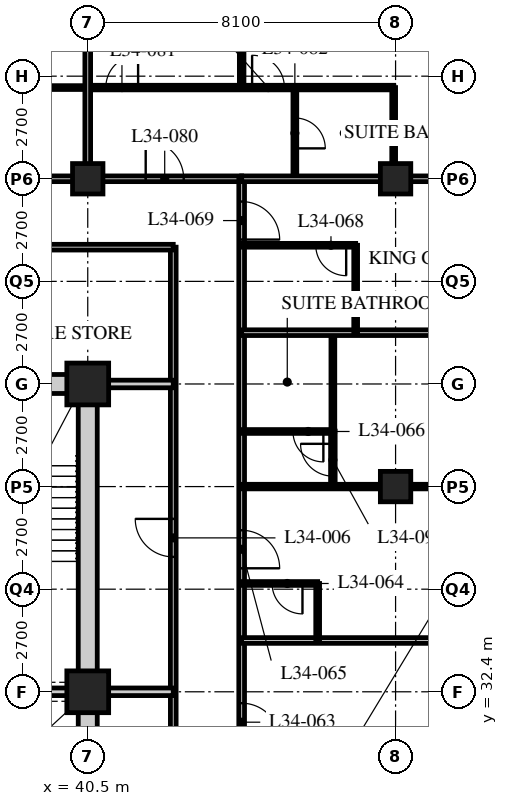
"""IFC4 building model, lengths in metres.
Left out: names, types, materials, properties, quantities, classifications, styles, units other than length and angle.
Written with IfcOpenShell. Run it as: python <this file> out.ifc"""

import sys

from ifc_helpers import new_model, si_unit, direction, frame, frame_2d, origin, origin_2d, place, context, subcontext, project, spatial, rectangle, hollow_rectangle, extrude, element, fill, save


model = new_model("IFC4")
c1 = context("Model", 3, precision=1e-05, world=origin(), true_north=direction((0.0, 1.0)))
c2 = subcontext(c1, "Body", "Model", "MODEL_VIEW")
j1 = project(units=[si_unit("LENGTHUNIT", "METRE"), si_unit("PLANEANGLEUNIT", "RADIAN")], contexts=[c1])
p1 = place(None, origin())
s1 = spatial("IfcSite", under=j1, at=p1, CompositionType="ELEMENT")
p2 = place(p1, origin())
s2 = spatial("IfcBuilding", under=s1, at=p2, CompositionType="ELEMENT")
p3 = place(p2, frame((0.0, 0.0, 134.0)))
s3 = spatial("IfcBuildingStorey", under=s2, at=p3, CompositionType="ELEMENT", Elevation=134.0)
for number, where, z_axis, x_axis in (
    (1, (40.5, 32.4, 0.0), (0.0, 0.0, 1.0), (1.0, 0.0, 0.0)),
    (2, (40.5, 40.5, 0.0), (0.0, 0.0, 1.0), (1.0, 0.0, 0.0)),
):
    element("IfcColumn", number, at=place(p3, frame(where, z_axis=z_axis, x_axis=x_axis)), inside=s3, PredefinedType="COLUMN", context=c2, shape_type="SweptSolid", body=[
        extrude(hollow_rectangle(XDim=1.1, YDim=1.1, WallThickness=0.1, at=origin_2d()), origin(), (0.0, 0.0, 1.0), 3.4),
    ])
for number, where, z_axis, x_axis in (
    (3, (40.5, 45.9, 0.0), (0.0, 0.0, 1.0), (1.0, 0.0, 0.0)),
    (4, (48.6, 37.8, 0.0), (0.0, 0.0, 1.0), (1.0, 0.0, 0.0)),
    (5, (48.6, 45.9, 0.0), (0.0, 0.0, 1.0), (1.0, 0.0, 0.0)),
):
    element("IfcColumn", number, at=place(p3, frame(where, z_axis=z_axis, x_axis=x_axis)), inside=s3, PredefinedType="COLUMN", context=c2, shape_type="SweptSolid", body=[
        extrude(hollow_rectangle(XDim=0.8, YDim=0.8, WallThickness=0.08, at=origin_2d()), origin(), (0.0, 0.0, 1.0), 3.4),
    ])
p4 = place(p3, frame((8.1, 45.9, 0.0), z_axis=(0.0, 0.0, 1.0), x_axis=(1.0, 0.0, 0.0)))
e6 = element("IfcWall", 6, at=p4, inside=s3, PredefinedType="PARTITIONING", context=c2, shape_type="SweptSolid", body=[
    extrude(rectangle(XDim=36.45, YDim=0.15, at=frame_2d((18.225, 0.0))), origin(), (0.0, 0.0, 1.0), 2.578),
])
p5 = place(p4, frame((9.625, 0.0, 0.0)))
e7 = element("IfcOpeningElement", 7, at=p5, cuts=e6, PredefinedType="OPENING", context=c2, shape_type="SweptSolid", body=[
    extrude(rectangle(XDim=1.0, YDim=2.1, at=frame_2d((0.5, 1.05))), frame((0.0, 0.085, 0.0), z_axis=(0.0, -1.0, 0.0), x_axis=(1.0, 0.0, 0.0)), (0.0, 0.0, 1.0), 0.17),
])
p6 = place(p4, frame((21.775, 0.0, 0.0)))
e8 = element("IfcOpeningElement", 8, at=p6, cuts=e6, PredefinedType="OPENING", context=c2, shape_type="SweptSolid", body=[
    extrude(rectangle(XDim=1.0, YDim=2.1, at=frame_2d((0.5, 1.05))), frame((0.0, 0.085, 0.0), z_axis=(0.0, -1.0, 0.0), x_axis=(1.0, 0.0, 0.0)), (0.0, 0.0, 1.0), 0.17),
])
p7 = place(p4, frame((28.95, 0.0, 0.0)))
e9 = element("IfcOpeningElement", 9, at=p7, cuts=e6, PredefinedType="OPENING", context=c2, shape_type="SweptSolid", body=[
    extrude(rectangle(XDim=1.0, YDim=2.1, at=frame_2d((0.5, 1.05))), frame((0.0, 0.085, 0.0), z_axis=(0.0, -1.0, 0.0), x_axis=(1.0, 0.0, 0.0)), (0.0, 0.0, 1.0), 0.17),
])
p8 = place(p4, frame((33.925, 0.0, 0.0)))
e10 = element("IfcOpeningElement", 10, at=p8, cuts=e6, PredefinedType="OPENING", context=c2, shape_type="SweptSolid", body=[
    extrude(rectangle(XDim=1.0, YDim=2.1, at=frame_2d((0.5, 1.05))), frame((0.0, 0.085, 0.0), z_axis=(0.0, -1.0, 0.0), x_axis=(1.0, 0.0, 0.0)), (0.0, 0.0, 1.0), 0.17),
])
p9 = place(p4, frame((2.625, 0.0, 0.0)))
e11 = element("IfcOpeningElement", 11, at=p9, cuts=e6, PredefinedType="OPENING", context=c2, shape_type="SweptSolid", body=[
    extrude(rectangle(XDim=1.0, YDim=2.1, at=frame_2d((0.5, 1.05))), frame((0.0, 0.085, 0.0), z_axis=(0.0, -1.0, 0.0), x_axis=(1.0, 0.0, 0.0)), (0.0, 0.0, 1.0), 0.17),
])
p10 = place(p3, frame((44.55, 17.55, 0.0), z_axis=(0.0, 0.0, 1.0), x_axis=(0.0, 1.0, 0.0)))
e12 = element("IfcWall", 12, at=p10, inside=s3, PredefinedType="PARTITIONING", context=c2, shape_type="SweptSolid", body=[
    extrude(rectangle(XDim=28.35, YDim=0.15, at=frame_2d((14.175, 0.0))), origin(), (0.0, 0.0, 1.0), 3.19),
])
p11 = place(p10, frame((2.75, 0.0, 0.0)))
e13 = element("IfcOpeningElement", 13, at=p11, cuts=e12, PredefinedType="OPENING", context=c2, shape_type="SweptSolid", body=[
    extrude(rectangle(XDim=1.0, YDim=2.1, at=frame_2d((0.5, 1.05))), frame((0.0, 0.085, 0.0), z_axis=(0.0, -1.0, 0.0), x_axis=(1.0, 0.0, 0.0)), (0.0, 0.0, 1.0), 0.17),
])
p12 = place(p10, frame((6.5, 0.0, 0.0)))
e14 = element("IfcOpeningElement", 14, at=p12, cuts=e12, PredefinedType="OPENING", context=c2, shape_type="SweptSolid", body=[
    extrude(rectangle(XDim=1.0, YDim=2.1, at=frame_2d((0.5, 1.05))), frame((0.0, 0.085, 0.0), z_axis=(0.0, -1.0, 0.0), x_axis=(1.0, 0.0, 0.0)), (0.0, 0.0, 1.0), 0.17),
])
p13 = place(p10, frame((13.55, 0.0, 0.0)))
e15 = element("IfcOpeningElement", 15, at=p13, cuts=e12, PredefinedType="OPENING", context=c2, shape_type="SweptSolid", body=[
    extrude(rectangle(XDim=1.0, YDim=2.1, at=frame_2d((0.5, 1.05))), frame((0.0, 0.085, 0.0), z_axis=(0.0, -1.0, 0.0), x_axis=(1.0, 0.0, 0.0)), (0.0, 0.0, 1.0), 0.17),
])
p14 = place(p10, frame((18.1, 0.0, 0.0)))
e16 = element("IfcOpeningElement", 16, at=p14, cuts=e12, PredefinedType="OPENING", context=c2, shape_type="SweptSolid", body=[
    extrude(rectangle(XDim=1.0, YDim=2.1, at=frame_2d((0.5, 1.05))), frame((0.0, 0.085, 0.0), z_axis=(0.0, -1.0, 0.0), x_axis=(1.0, 0.0, 0.0)), (0.0, 0.0, 1.0), 0.17),
])
p15 = place(p10, frame((26.75, 0.0, 0.0)))
e17 = element("IfcOpeningElement", 17, at=p15, cuts=e12, PredefinedType="OPENING", context=c2, shape_type="SweptSolid", body=[
    extrude(rectangle(XDim=1.0, YDim=2.1, at=frame_2d((0.5, 1.05))), frame((0.0, 0.085, 0.0), z_axis=(0.0, -1.0, 0.0), x_axis=(1.0, 0.0, 0.0)), (0.0, 0.0, 1.0), 0.17),
])
p16 = place(p3, frame((42.75, 19.35, 0.0), z_axis=(0.0, 0.0, 1.0), x_axis=(0.0, 1.0, 0.0)))
e18 = element("IfcWall", 18, at=p16, inside=s3, PredefinedType="PARTITIONING", context=c2, shape_type="SweptSolid", body=[
    extrude(rectangle(XDim=24.75, YDim=0.15, at=frame_2d((12.375, 0.0))), origin(), (0.0, 0.0, 1.0), 3.19),
])
p17 = place(p16, frame((8.5, 0.0, 0.0)))
e19 = element("IfcOpeningElement", 19, at=p17, cuts=e18, PredefinedType="OPENING", context=c2, shape_type="SweptSolid", body=[
    extrude(rectangle(XDim=1.0, YDim=2.1, at=frame_2d((0.5, 1.05))), frame((0.0, 0.085, 0.0), z_axis=(0.0, -1.0, 0.0), x_axis=(1.0, 0.0, 0.0)), (0.0, 0.0, 1.0), 0.17),
])
p18 = place(p16, frame((16.6, 0.0, 0.0)))
e20 = element("IfcOpeningElement", 20, at=p18, cuts=e18, PredefinedType="OPENING", context=c2, shape_type="SweptSolid", body=[
    extrude(rectangle(XDim=1.0, YDim=2.1, at=frame_2d((0.5, 1.05))), frame((0.0, 0.085, 0.0), z_axis=(0.0, -1.0, 0.0), x_axis=(1.0, 0.0, 0.0)), (0.0, 0.0, 1.0), 0.17),
])
p19 = place(p3, frame((42.75, 44.1, 0.0), z_axis=(0.0, 0.0, 1.0), x_axis=(-1.0, 0.0, 0.0)))
e21 = element("IfcWall", 21, at=p19, inside=s3, PredefinedType="PARTITIONING", context=c2, shape_type="SweptSolid", body=[
    extrude(rectangle(XDim=13.19, YDim=0.15, at=frame_2d((6.595, 0.0))), origin(), (0.0, 0.0, 1.0), 3.19),
])
p20 = place(p19, frame((10.2, 0.0, 0.0)))
e22 = element("IfcOpeningElement", 22, at=p20, cuts=e21, PredefinedType="OPENING", context=c2, shape_type="SweptSolid", body=[
    extrude(rectangle(XDim=1.0, YDim=2.1, at=frame_2d((0.5, 1.05))), frame((0.0, 0.085, 0.0), z_axis=(0.0, -1.0, 0.0), x_axis=(1.0, 0.0, 0.0)), (0.0, 0.0, 1.0), 0.17),
])
p21 = place(p19, frame((3.6, 0.0, 0.0)))
e23 = element("IfcOpeningElement", 23, at=p21, cuts=e21, PredefinedType="OPENING", context=c2, shape_type="SweptSolid", body=[
    extrude(rectangle(XDim=1.0, YDim=2.1, at=frame_2d((0.5, 1.05))), frame((0.0, 0.085, 0.0), z_axis=(0.0, -1.0, 0.0), x_axis=(1.0, 0.0, 0.0)), (0.0, 0.0, 1.0), 0.17),
])
for number, where, z_axis, x_axis in (
    (24, (40.5, 32.4, 0.0), (0.0, 0.0, 1.0), (1.0, 0.0, 0.0)),
    (25, (40.5, 40.5, 0.0), (0.0, 0.0, 1.0), (1.0, 0.0, 0.0)),
):
    element("IfcWall", number, at=place(p3, frame(where, z_axis=z_axis, x_axis=x_axis)), inside=s3, PredefinedType="SOLIDWALL", context=c2, shape_type="SweptSolid", body=[
        extrude(rectangle(XDim=2.25, YDim=0.2, at=frame_2d((1.125, 0.0))), origin(), (0.0, 0.0, 1.0), 3.19),
    ])
p22 = place(p3, frame((38.2, 48.3, 0.0), z_axis=(0.0, 0.0, 1.0), x_axis=(1.0, 0.0, 0.0)))
e26 = element("IfcWall", 26, at=p22, inside=s3, PredefinedType="PARTITIONING", context=c2, shape_type="SweptSolid", body=[
    extrude(rectangle(XDim=2.3, YDim=0.1, at=frame_2d((1.15, 0.0))), origin(), (0.0, 0.0, 1.0), 3.19),
])
p23 = place(p3, frame((44.55, 33.75, 0.0), z_axis=(0.0, 0.0, 1.0), x_axis=(1.0, 0.0, 0.0)))
e27 = element("IfcWall", 27, at=p23, inside=s3, PredefinedType="PARTITIONING", context=c2, shape_type="SweptSolid", body=[
    extrude(rectangle(XDim=11.85, YDim=0.15, at=frame_2d((5.925, 0.0))), origin(), (0.0, 0.0, 1.0), 3.19),
])
p24 = place(p3, frame((46.55, 33.75, 0.0), z_axis=(0.0, 0.0, 1.0), x_axis=(0.0, 1.0, 0.0)))
e28 = element("IfcWall", 28, at=p24, inside=s3, PredefinedType="PARTITIONING", context=c2, shape_type="SweptSolid", body=[
    extrude(rectangle(XDim=1.5, YDim=0.1, at=frame_2d((0.75, 0.0))), origin(), (0.0, 0.0, 1.0), 3.19),
])
p25 = place(p3, frame((44.55, 35.25, 0.0), z_axis=(0.0, 0.0, 1.0), x_axis=(1.0, 0.0, 0.0)))
e29 = element("IfcWall", 29, at=p25, inside=s3, PredefinedType="PARTITIONING", context=c2, shape_type="SweptSolid", body=[
    extrude(rectangle(XDim=2.0, YDim=0.1, at=frame_2d((1.0, 0.0))), origin(), (0.0, 0.0, 1.0), 3.19),
])
p26 = place(p25, frame((0.8, 0.0, 0.0)))
e30 = element("IfcOpeningElement", 30, at=p26, cuts=e29, PredefinedType="OPENING", context=c2, shape_type="SweptSolid", body=[
    extrude(rectangle(XDim=0.8, YDim=2.1, at=frame_2d((0.4, 1.05))), frame((0.0, 0.06, 0.0), z_axis=(0.0, -1.0, 0.0), x_axis=(1.0, 0.0, 0.0)), (0.0, 0.0, 1.0), 0.12),
])
p27 = place(p3, frame((46.95, 39.25, 0.0), z_axis=(0.0, 0.0, 1.0), x_axis=(0.0, 1.0, 0.0)))
e31 = element("IfcWall", 31, at=p27, inside=s3, PredefinedType="PARTITIONING", context=c2, shape_type="SweptSolid", body=[
    extrude(rectangle(XDim=2.6, YDim=0.1, at=frame_2d((1.3, 0.0))), origin(), (0.0, 0.0, 1.0), 3.19),
])
p28 = place(p3, frame((44.55, 39.25, 0.0), z_axis=(0.0, 0.0, 1.0), x_axis=(1.0, 0.0, 0.0)))
e32 = element("IfcWall", 32, at=p28, inside=s3, PredefinedType="PARTITIONING", context=c2, shape_type="SweptSolid", body=[
    extrude(rectangle(XDim=2.4, YDim=0.1, at=frame_2d((1.2, 0.0))), origin(), (0.0, 0.0, 1.0), 3.19),
])
p29 = place(p28, frame((1.35, 0.0, 0.0)))
e33 = element("IfcOpeningElement", 33, at=p29, cuts=e32, PredefinedType="OPENING", context=c2, shape_type="SweptSolid", body=[
    extrude(rectangle(XDim=0.8, YDim=2.1, at=frame_2d((0.4, 1.05))), frame((0.0, 0.06, 0.0), z_axis=(0.0, -1.0, 0.0), x_axis=(1.0, 0.0, 0.0)), (0.0, 0.0, 1.0), 0.12),
])
p30 = place(p3, frame((44.55, 37.8, 0.0), z_axis=(0.0, 0.0, 1.0), x_axis=(1.0, 0.0, 0.0)))
e34 = element("IfcWall", 34, at=p30, inside=s3, PredefinedType="PARTITIONING", context=c2, shape_type="SweptSolid", body=[
    extrude(rectangle(XDim=11.85, YDim=0.12, at=frame_2d((5.925, 0.0))), origin(), (0.0, 0.0, 1.0), 2.578),
])
p31 = place(p30, frame((6.85, 0.0, 0.0)))
e35 = element("IfcOpeningElement", 35, at=p31, cuts=e34, PredefinedType="OPENING", context=c2, shape_type="SweptSolid", body=[
    extrude(rectangle(XDim=0.85, YDim=2.1, at=frame_2d((0.425, 1.05))), frame((0.0, 0.07, 0.0), z_axis=(0.0, -1.0, 0.0), x_axis=(1.0, 0.0, 0.0)), (0.0, 0.0, 1.0), 0.14),
])
p32 = place(p3, frame((44.55, 41.85, 0.0), z_axis=(0.0, 0.0, 1.0), x_axis=(1.0, 0.0, 0.0)))
e36 = element("IfcWall", 36, at=p32, inside=s3, PredefinedType="PARTITIONING", context=c2, shape_type="SweptSolid", body=[
    extrude(rectangle(XDim=11.85, YDim=0.15, at=frame_2d((5.925, 0.0))), origin(), (0.0, 0.0, 1.0), 3.19),
])
p33 = place(p3, frame((47.55, 41.85, 0.0), z_axis=(0.0, 0.0, 1.0), x_axis=(0.0, 1.0, 0.0)))
e37 = element("IfcWall", 37, at=p33, inside=s3, PredefinedType="PARTITIONING", context=c2, shape_type="SweptSolid", body=[
    extrude(rectangle(XDim=2.3, YDim=0.1, at=frame_2d((1.15, 0.0))), origin(), (0.0, 0.0, 1.0), 3.19),
])
p34 = place(p3, frame((44.55, 44.15, 0.0), z_axis=(0.0, 0.0, 1.0), x_axis=(1.0, 0.0, 0.0)))
e38 = element("IfcWall", 38, at=p34, inside=s3, PredefinedType="PARTITIONING", context=c2, shape_type="SweptSolid", body=[
    extrude(rectangle(XDim=3.0, YDim=0.1, at=frame_2d((1.5, 0.0))), origin(), (0.0, 0.0, 1.0), 3.19),
])
p35 = place(p34, frame((1.95, 0.0, 0.0)))
e39 = element("IfcOpeningElement", 39, at=p35, cuts=e38, PredefinedType="OPENING", context=c2, shape_type="SweptSolid", body=[
    extrude(rectangle(XDim=0.8, YDim=2.1, at=frame_2d((0.4, 1.05))), frame((0.0, 0.06, 0.0), z_axis=(0.0, -1.0, 0.0), x_axis=(1.0, 0.0, 0.0)), (0.0, 0.0, 1.0), 0.12),
])
p36 = place(p3, frame((40.5, 48.3, 0.0), z_axis=(0.0, 0.0, 1.0), x_axis=(1.0, 0.0, 0.0)))
e40 = element("IfcWall", 40, at=p36, inside=s3, PredefinedType="PARTITIONING", context=c2, shape_type="SweptSolid", body=[
    extrude(rectangle(XDim=8.05, YDim=0.12, at=frame_2d((4.025, 0.0))), origin(), (0.0, 0.0, 1.0), 3.19),
])
p37 = place(p36, frame((0.475, 0.0, 0.0)))
e41 = element("IfcOpeningElement", 41, at=p37, cuts=e40, PredefinedType="OPENING", context=c2, shape_type="SweptSolid", body=[
    extrude(rectangle(XDim=0.85, YDim=2.1, at=frame_2d((0.425, 1.05))), frame((0.0, 0.07, 0.0), z_axis=(0.0, -1.0, 0.0), x_axis=(1.0, 0.0, 0.0)), (0.0, 0.0, 1.0), 0.14),
])
p38 = place(p36, frame((4.325, 0.0, 0.0)))
e42 = element("IfcOpeningElement", 42, at=p38, cuts=e40, PredefinedType="OPENING", context=c2, shape_type="SweptSolid", body=[
    extrude(rectangle(XDim=0.85, YDim=2.1, at=frame_2d((0.425, 1.05))), frame((0.0, 0.07, 0.0), z_axis=(0.0, -1.0, 0.0), x_axis=(1.0, 0.0, 0.0)), (0.0, 0.0, 1.0), 0.14),
])
p39 = place(p3, frame((45.95, 45.9, 0.0), z_axis=(0.0, 0.0, 1.0), x_axis=(0.0, 1.0, 0.0)))
e43 = element("IfcWall", 43, at=p39, inside=s3, PredefinedType="PARTITIONING", context=c2, shape_type="SweptSolid", body=[
    extrude(rectangle(XDim=2.4, YDim=0.1, at=frame_2d((1.2, 0.0))), origin(), (0.0, 0.0, 1.0), 3.19),
])
p40 = place(p39, frame((0.8, 0.0, 0.0)))
e44 = element("IfcOpeningElement", 44, at=p40, cuts=e43, PredefinedType="OPENING", context=c2, shape_type="SweptSolid", body=[
    extrude(rectangle(XDim=0.8, YDim=2.1, at=frame_2d((0.4, 1.05))), frame((0.0, 0.06, 0.0), z_axis=(0.0, -1.0, 0.0), x_axis=(1.0, 0.0, 0.0)), (0.0, 0.0, 1.0), 0.12),
])
p41 = place(p3, frame((48.55, 45.9, 0.0), z_axis=(0.0, 0.0, 1.0), x_axis=(0.0, 1.0, 0.0)))
e45 = element("IfcWall", 45, at=p41, inside=s3, PredefinedType="PARTITIONING", context=c2, shape_type="SweptSolid", body=[
    extrude(rectangle(XDim=2.4, YDim=0.1, at=frame_2d((1.2, 0.0))), origin(), (0.0, 0.0, 1.0), 2.578),
])
p42 = place(p3, frame((44.55, 48.3, 0.0), z_axis=(0.0, 0.0, 1.0), x_axis=(0.0, 1.0, 0.0)))
e46 = element("IfcWall", 46, at=p42, inside=s3, PredefinedType="PARTITIONING", context=c2, shape_type="SweptSolid", body=[
    extrude(rectangle(XDim=5.4, YDim=0.12, at=frame_2d((2.7, 0.0))), origin(), (0.0, 0.0, 1.0), 3.19),
])
for number, where, z_axis, x_axis in (
    (47, (44.55, 45.9, 0.0), (0.0, 0.0, 1.0), (1.0, 0.0, 0.0)),
    (48, (40.5, 45.9, 0.0), (0.0, 0.0, 1.0), (0.0, 1.0, 0.0)),
):
    element("IfcWall", number, at=place(p3, frame(where, z_axis=z_axis, x_axis=x_axis)), inside=s3, PredefinedType="PARTITIONING", context=c2, shape_type="SweptSolid", body=[
        extrude(rectangle(XDim=7.8, YDim=0.15, at=frame_2d((3.9, 0.0))), origin(), (0.0, 0.0, 1.0), 2.578),
    ])
p43 = place(p3, frame((46.95, 39.26, 0.0), z_axis=(0.0, 0.0, 1.0), x_axis=(0.0, -1.0, 0.0)))
e49 = element("IfcWall", 49, at=p43, inside=s3, PredefinedType="PARTITIONING", context=c2, shape_type="SweptSolid", body=[
    extrude(rectangle(XDim=1.46, YDim=0.12, at=frame_2d((0.73, 0.0))), origin(), (0.0, 0.0, 1.0), 3.19),
])
p44 = place(p43, frame((0.335, 0.0, 0.0)))
e50 = element("IfcOpeningElement", 50, at=p44, cuts=e49, PredefinedType="OPENING", context=c2, shape_type="SweptSolid", body=[
    extrude(rectangle(XDim=0.85, YDim=2.1, at=frame_2d((0.425, 1.05))), frame((0.0, 0.07, 0.0), z_axis=(0.0, -1.0, 0.0), x_axis=(1.0, 0.0, 0.0)), (0.0, 0.0, 1.0), 0.14),
])
p45 = place(p3, frame((15.95, 40.5, 0.0), z_axis=(0.0, 0.0, 1.0), x_axis=(1.0, 0.0, 0.0)))
e51 = element("IfcWall", 51, at=p45, inside=s3, PredefinedType="SOLIDWALL", context=c2, shape_type="SweptSolid", body=[
    extrude(rectangle(XDim=24.8, YDim=0.5, at=frame_2d((12.4, 0.0))), origin(), (0.0, 0.0, 1.0), 2.54),
])
p46 = place(p45, frame((11.5, 0.0, 0.0)))
e52 = element("IfcOpeningElement", 52, at=p46, cuts=e51, PredefinedType="OPENING", context=c2, shape_type="SweptSolid", body=[
    extrude(rectangle(XDim=1.8, YDim=2.4, at=frame_2d((0.9, 1.2))), frame((0.0, 0.26, 0.0), z_axis=(0.0, -1.0, 0.0), x_axis=(1.0, 0.0, 0.0)), (0.0, 0.0, 1.0), 0.52),
])
p47 = place(p3, frame((40.5, 24.55, 0.0), z_axis=(0.0, 0.0, 1.0), x_axis=(0.0, 1.0, 0.0)))
e53 = element("IfcWall", 53, at=p47, inside=s3, PredefinedType="SOLIDWALL", context=c2, shape_type="SweptSolid", body=[
    extrude(rectangle(XDim=15.7, YDim=0.5, at=frame_2d((7.85, 0.0))), origin(), (0.0, 0.0, 1.0), 2.578),
])
p48 = place(p3, frame((32.3, 32.4, 0.0), z_axis=(0.0, 0.0, 1.0), x_axis=(1.0, 0.0, 0.0)))
e54 = element("IfcWall", 54, at=p48, inside=s3, PredefinedType="SOLIDWALL", context=c2, shape_type="SweptSolid", body=[
    extrude(rectangle(XDim=7.95, YDim=0.2, at=frame_2d((3.975, 0.0))), origin(), (0.0, 0.0, 1.0), 2.578),
])
p49 = place(p18, origin())
e55 = element("IfcDoor", 55, at=p49, inside=s3, OperationType="SINGLE_SWING_RIGHT", PredefinedType="DOOR", context=c2, shape_type="SweptSolid", body=[
    extrude(rectangle(XDim=1.0, YDim=2.1, at=frame_2d((0.5, 1.05))), frame((0.0, 0.025, 0.0), z_axis=(0.0, -1.0, 0.0), x_axis=(1.0, 0.0, 0.0)), (0.0, 0.0, 1.0), 0.05),
])
fill(e20, e55)
p50 = place(p13, origin())
e56 = element("IfcDoor", 56, at=p50, inside=s3, OperationType="SINGLE_SWING_RIGHT", PredefinedType="DOOR", context=c2, shape_type="SweptSolid", body=[
    extrude(rectangle(XDim=1.0, YDim=2.1, at=frame_2d((0.5, 1.05))), frame((0.0, 0.025, 0.0), z_axis=(0.0, -1.0, 0.0), x_axis=(1.0, 0.0, 0.0)), (0.0, 0.0, 1.0), 0.05),
])
fill(e15, e56)
p51 = place(p26, origin())
e57 = element("IfcDoor", 57, at=p51, inside=s3, OperationType="SINGLE_SWING_LEFT", PredefinedType="DOOR", context=c2, shape_type="SweptSolid", body=[
    extrude(rectangle(XDim=0.8, YDim=2.1, at=frame_2d((0.4, 1.05))), frame((0.0, 0.025, 0.0), z_axis=(0.0, -1.0, 0.0), x_axis=(1.0, 0.0, 0.0)), (0.0, 0.0, 1.0), 0.05),
])
fill(e30, e57)
p52 = place(p14, origin())
e58 = element("IfcDoor", 58, at=p52, inside=s3, OperationType="SINGLE_SWING_RIGHT", PredefinedType="DOOR", context=c2, shape_type="SweptSolid", body=[
    extrude(rectangle(XDim=1.0, YDim=2.1, at=frame_2d((0.5, 1.05))), frame((0.0, 0.025, 0.0), z_axis=(0.0, -1.0, 0.0), x_axis=(1.0, 0.0, 0.0)), (0.0, 0.0, 1.0), 0.05),
])
fill(e16, e58)
p53 = place(p29, origin())
e59 = element("IfcDoor", 59, at=p53, inside=s3, OperationType="SINGLE_SWING_LEFT", PredefinedType="DOOR", context=c2, shape_type="SweptSolid", body=[
    extrude(rectangle(XDim=0.8, YDim=2.1, at=frame_2d((0.4, 1.05))), frame((0.0, 0.025, 0.0), z_axis=(0.0, -1.0, 0.0), x_axis=(1.0, 0.0, 0.0)), (0.0, 0.0, 1.0), 0.05),
])
fill(e33, e59)
p54 = place(p35, origin())
e60 = element("IfcDoor", 60, at=p54, inside=s3, OperationType="SINGLE_SWING_LEFT", PredefinedType="DOOR", context=c2, shape_type="SweptSolid", body=[
    extrude(rectangle(XDim=0.8, YDim=2.1, at=frame_2d((0.4, 1.05))), frame((0.0, 0.025, 0.0), z_axis=(0.0, -1.0, 0.0), x_axis=(1.0, 0.0, 0.0)), (0.0, 0.0, 1.0), 0.05),
])
fill(e39, e60)
p55 = place(p15, origin())
e61 = element("IfcDoor", 61, at=p55, inside=s3, OperationType="SINGLE_SWING_RIGHT", PredefinedType="DOOR", context=c2, shape_type="SweptSolid", body=[
    extrude(rectangle(XDim=1.0, YDim=2.1, at=frame_2d((0.5, 1.05))), frame((0.0, 0.025, 0.0), z_axis=(0.0, -1.0, 0.0), x_axis=(1.0, 0.0, 0.0)), (0.0, 0.0, 1.0), 0.05),
])
fill(e17, e61)
p56 = place(p8, origin())
e62 = element("IfcDoor", 62, at=p56, inside=s3, OperationType="SINGLE_SWING_LEFT", PredefinedType="DOOR", context=c2, shape_type="SweptSolid", body=[
    extrude(rectangle(XDim=1.0, YDim=2.1, at=frame_2d((0.5, 1.05))), frame((0.0, 0.025, 0.0), z_axis=(0.0, -1.0, 0.0), x_axis=(1.0, 0.0, 0.0)), (0.0, 0.0, 1.0), 0.05),
])
fill(e10, e62)
p57 = place(p37, origin())
e63 = element("IfcDoor", 63, at=p57, inside=s3, OperationType="SINGLE_SWING_RIGHT", PredefinedType="DOOR", context=c2, shape_type="SweptSolid", body=[
    extrude(rectangle(XDim=0.85, YDim=2.1, at=frame_2d((0.425, 1.05))), frame((0.0, 0.025, 0.0), z_axis=(0.0, -1.0, 0.0), x_axis=(1.0, 0.0, 0.0)), (0.0, 0.0, 1.0), 0.05),
])
fill(e41, e63)
p58 = place(p40, origin())
e64 = element("IfcDoor", 64, at=p58, inside=s3, OperationType="SINGLE_SWING_RIGHT", PredefinedType="DOOR", context=c2, shape_type="SweptSolid", body=[
    extrude(rectangle(XDim=0.8, YDim=2.1, at=frame_2d((0.4, 1.05))), frame((0.0, 0.025, 0.0), z_axis=(0.0, -1.0, 0.0), x_axis=(1.0, 0.0, 0.0)), (0.0, 0.0, 1.0), 0.05),
])
fill(e44, e64)
p59 = place(p38, origin())
e65 = element("IfcDoor", 65, at=p59, inside=s3, OperationType="SINGLE_SWING_LEFT", PredefinedType="DOOR", context=c2, shape_type="SweptSolid", body=[
    extrude(rectangle(XDim=0.85, YDim=2.1, at=frame_2d((0.425, 1.05))), frame((0.0, 0.025, 0.0), z_axis=(0.0, -1.0, 0.0), x_axis=(1.0, 0.0, 0.0)), (0.0, 0.0, 1.0), 0.05),
])
fill(e42, e65)
p60 = place(p44, origin())
e66 = element("IfcDoor", 66, at=p60, inside=s3, OperationType="SINGLE_SWING_RIGHT", PredefinedType="DOOR", context=c2, shape_type="SweptSolid", body=[
    extrude(rectangle(XDim=0.85, YDim=2.1, at=frame_2d((0.425, 1.05))), frame((0.0, 0.025, 0.0), z_axis=(0.0, -1.0, 0.0), x_axis=(1.0, 0.0, 0.0)), (0.0, 0.0, 1.0), 0.05),
])
fill(e50, e66)
save(model, sys.argv[1])
